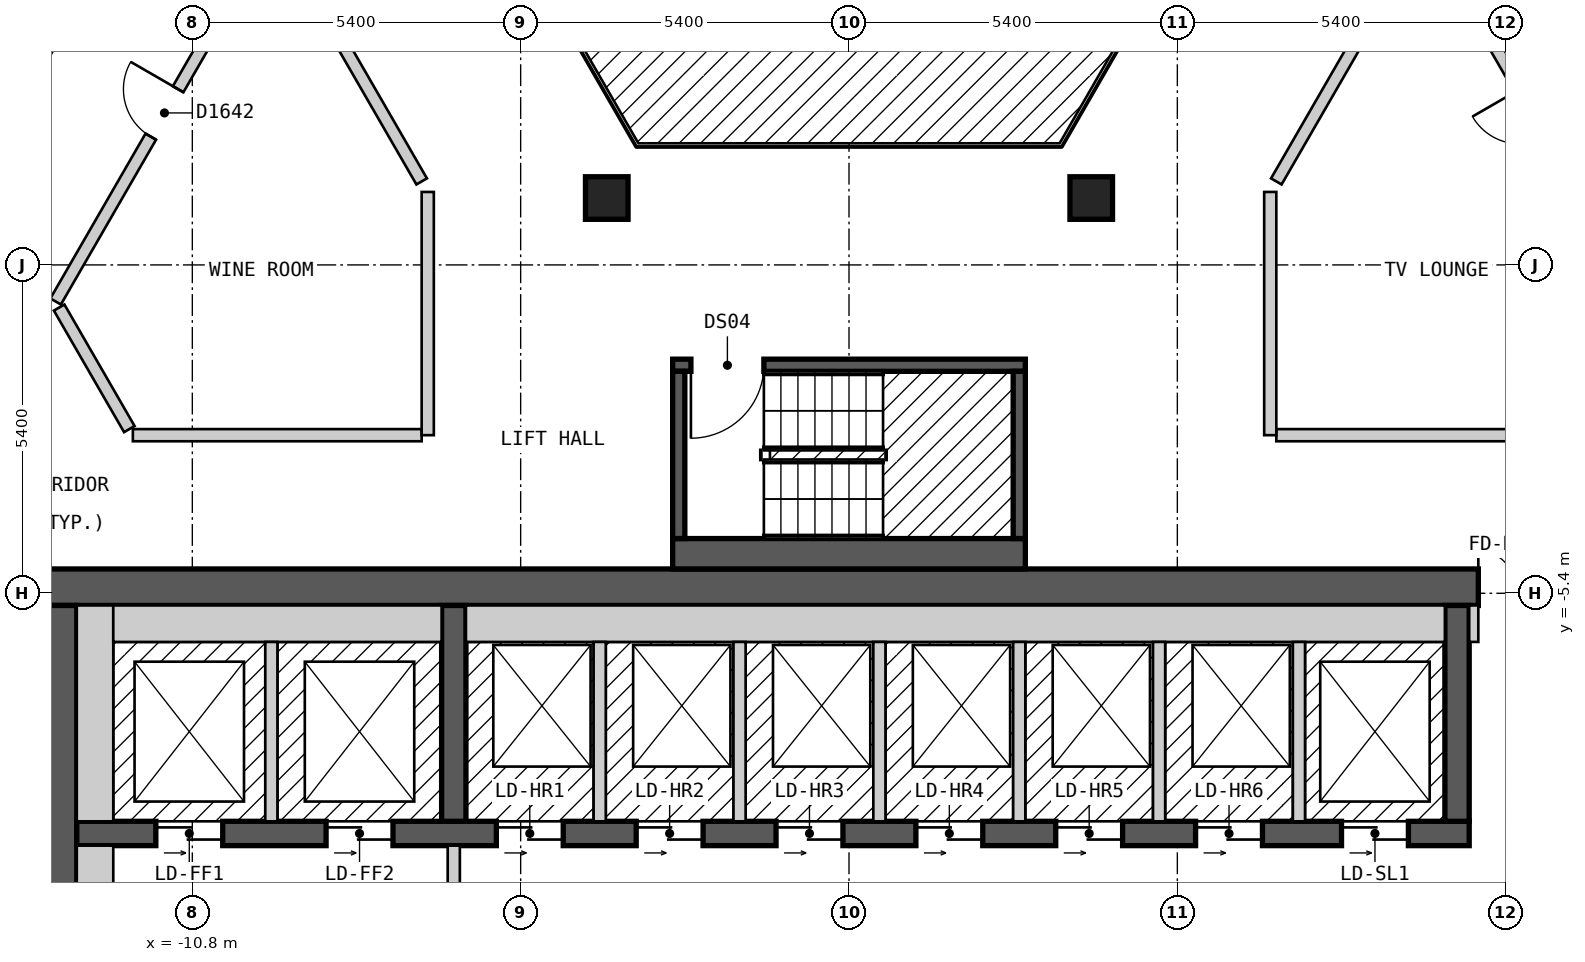
"""IFC4 building model, lengths in metres.
Left out: names, types, materials, properties, quantities, classifications, styles, units other than length and angle.
Written with IfcOpenShell. Run it as: python <this file> out.ifc"""

import sys

from ifc_helpers import new_model, si_unit, direction, frame, frame_2d, origin, origin_2d, place, context, subcontext, project, spatial, rectangle, extrude, element, fill, save


model = new_model("IFC4")
c1 = context("Model", 3, precision=1e-05, world=origin(), true_north=direction((0.0, 1.0)))
c2 = subcontext(c1, "Body", "Model", "MODEL_VIEW")
j1 = project(units=[si_unit("LENGTHUNIT", "METRE"), si_unit("PLANEANGLEUNIT", "RADIAN")], contexts=[c1])
p1 = place(None, origin())
s1 = spatial("IfcSite", under=j1, at=p1, CompositionType="ELEMENT")
p2 = place(p1, origin())
s2 = spatial("IfcBuilding", under=s1, at=p2, CompositionType="ELEMENT")
p3 = place(p2, frame((0.0, 0.0, 163.2)))
s3 = spatial("IfcBuildingStorey", under=s2, at=p3, CompositionType="ELEMENT", Elevation=163.2)
for number, where, z_axis, x_axis in (
    (1, (3.984, 1.1, 0.0), (0.0, 0.0, 1.0), (1.0, 0.0, 0.0)),
    (2, (-3.984, 1.1, 0.0), (0.0, 0.0, 1.0), (1.0, 0.0, 0.0)),
):
    element("IfcColumn", number, at=place(p3, frame(where, z_axis=z_axis, x_axis=x_axis)), inside=s3, PredefinedType="COLUMN", context=c2, shape_type="SweptSolid", body=[
        extrude(rectangle(XDim=0.7, YDim=0.7, at=origin_2d()), origin(), (0.0, 0.0, 1.0), 3.0),
    ])
p4 = place(p3, frame((-13.3, -5.3, 0.0), z_axis=(0.0, 0.0, 1.0), x_axis=(1.0, 0.0, 0.0)))
e3 = element("IfcWall", 3, at=p4, inside=s3, PredefinedType="SHEAR", context=c2, shape_type="SweptSolid", body=[
    extrude(rectangle(XDim=26.6, YDim=0.6, at=frame_2d((13.3, 0.0))), origin(), (0.0, 0.0, 1.0), 2.7),
])
p5 = place(p4, frame((23.65, 0.0, 0.0)))
e4 = element("IfcOpeningElement", 4, at=p5, cuts=e3, PredefinedType="OPENING", context=c2, shape_type="SweptSolid", body=[
    extrude(rectangle(XDim=1.2, YDim=2.1, at=frame_2d((0.6, 1.05))), frame((0.0, 0.31, 0.0), z_axis=(0.0, -1.0, 0.0), x_axis=(1.0, 0.0, 0.0)), (0.0, 0.0, 1.0), 0.62),
])
p6 = place(p3, frame((-13.0, -18.4, 0.0), z_axis=(0.0, 0.0, 1.0), x_axis=(0.0, 1.0, 0.0)))
e5 = element("IfcWall", 5, at=p6, inside=s3, PredefinedType="SHEAR", context=c2, shape_type="SweptSolid", body=[
    extrude(rectangle(XDim=12.8, YDim=0.6, at=frame_2d((6.4, 0.0))), origin(), (0.0, 0.0, 1.0), 2.7),
])
p7 = place(p6, frame((4.2, 0.0, 0.0)))
e6 = element("IfcOpeningElement", 6, at=p7, cuts=e5, PredefinedType="OPENING", context=c2, shape_type="SweptSolid", body=[
    extrude(rectangle(XDim=1.2, YDim=2.1, at=frame_2d((0.6, 1.05))), frame((0.0, 0.31, 0.0), z_axis=(0.0, -1.0, 0.0), x_axis=(1.0, 0.0, 0.0)), (0.0, 0.0, 1.0), 0.62),
])
p8 = place(p3, frame((-12.7, -9.35, 0.0), z_axis=(0.0, 0.0, 1.0), x_axis=(1.0, 0.0, 0.0)))
e7 = element("IfcWall", 7, at=p8, inside=s3, PredefinedType="SHEAR", context=c2, shape_type="SweptSolid", body=[
    extrude(rectangle(XDim=22.9, YDim=0.4, at=frame_2d((11.45, 0.0))), origin(), (0.0, 0.0, 1.0), 2.7),
])
p9 = place(p8, frame((1.3, 0.0, 0.0)))
e8 = element("IfcOpeningElement", 8, at=p9, cuts=e7, PredefinedType="OPENING", context=c2, shape_type="SweptSolid", body=[
    extrude(rectangle(XDim=1.1, YDim=2.1, at=frame_2d((0.55, 1.05))), frame((0.0, 0.21, 0.0), z_axis=(0.0, -1.0, 0.0), x_axis=(1.0, 0.0, 0.0)), (0.0, 0.0, 1.0), 0.42),
])
p10 = place(p8, frame((4.1, 0.0, 0.0)))
e9 = element("IfcOpeningElement", 9, at=p10, cuts=e7, PredefinedType="OPENING", context=c2, shape_type="SweptSolid", body=[
    extrude(rectangle(XDim=1.1, YDim=2.1, at=frame_2d((0.55, 1.05))), frame((0.0, 0.21, 0.0), z_axis=(0.0, -1.0, 0.0), x_axis=(1.0, 0.0, 0.0)), (0.0, 0.0, 1.0), 0.42),
])
p11 = place(p8, frame((6.9, 0.0, 0.0)))
e10 = element("IfcOpeningElement", 10, at=p11, cuts=e7, PredefinedType="OPENING", context=c2, shape_type="SweptSolid", body=[
    extrude(rectangle(XDim=1.1, YDim=2.1, at=frame_2d((0.55, 1.05))), frame((0.0, 0.21, 0.0), z_axis=(0.0, -1.0, 0.0), x_axis=(1.0, 0.0, 0.0)), (0.0, 0.0, 1.0), 0.42),
])
p12 = place(p8, frame((9.2, 0.0, 0.0)))
e11 = element("IfcOpeningElement", 11, at=p12, cuts=e7, PredefinedType="OPENING", context=c2, shape_type="SweptSolid", body=[
    extrude(rectangle(XDim=1.1, YDim=2.1, at=frame_2d((0.55, 1.05))), frame((0.0, 0.21, 0.0), z_axis=(0.0, -1.0, 0.0), x_axis=(1.0, 0.0, 0.0)), (0.0, 0.0, 1.0), 0.42),
])
p13 = place(p8, frame((11.5, 0.0, 0.0)))
e12 = element("IfcOpeningElement", 12, at=p13, cuts=e7, PredefinedType="OPENING", context=c2, shape_type="SweptSolid", body=[
    extrude(rectangle(XDim=1.1, YDim=2.1, at=frame_2d((0.55, 1.05))), frame((0.0, 0.21, 0.0), z_axis=(0.0, -1.0, 0.0), x_axis=(1.0, 0.0, 0.0)), (0.0, 0.0, 1.0), 0.42),
])
p14 = place(p8, frame((13.8, 0.0, 0.0)))
e13 = element("IfcOpeningElement", 13, at=p14, cuts=e7, PredefinedType="OPENING", context=c2, shape_type="SweptSolid", body=[
    extrude(rectangle(XDim=1.1, YDim=2.1, at=frame_2d((0.55, 1.05))), frame((0.0, 0.21, 0.0), z_axis=(0.0, -1.0, 0.0), x_axis=(1.0, 0.0, 0.0)), (0.0, 0.0, 1.0), 0.42),
])
p15 = place(p8, frame((16.1, 0.0, 0.0)))
e14 = element("IfcOpeningElement", 14, at=p15, cuts=e7, PredefinedType="OPENING", context=c2, shape_type="SweptSolid", body=[
    extrude(rectangle(XDim=1.1, YDim=2.1, at=frame_2d((0.55, 1.05))), frame((0.0, 0.21, 0.0), z_axis=(0.0, -1.0, 0.0), x_axis=(1.0, 0.0, 0.0)), (0.0, 0.0, 1.0), 0.42),
])
p16 = place(p8, frame((18.4, 0.0, 0.0)))
e15 = element("IfcOpeningElement", 15, at=p16, cuts=e7, PredefinedType="OPENING", context=c2, shape_type="SweptSolid", body=[
    extrude(rectangle(XDim=1.1, YDim=2.1, at=frame_2d((0.55, 1.05))), frame((0.0, 0.21, 0.0), z_axis=(0.0, -1.0, 0.0), x_axis=(1.0, 0.0, 0.0)), (0.0, 0.0, 1.0), 0.42),
])
p17 = place(p8, frame((20.8, 0.0, 0.0)))
e16 = element("IfcOpeningElement", 16, at=p17, cuts=e7, PredefinedType="OPENING", context=c2, shape_type="SweptSolid", body=[
    extrude(rectangle(XDim=1.1, YDim=2.1, at=frame_2d((0.55, 1.05))), frame((0.0, 0.21, 0.0), z_axis=(0.0, -1.0, 0.0), x_axis=(1.0, 0.0, 0.0)), (0.0, 0.0, 1.0), 0.42),
])
for number, where, z_axis, x_axis in (
    (17, (-6.5, -9.15, 0.0), (0.0, 0.0, 1.0), (0.0, 1.0, 0.0)),
    (18, (10.0, -9.15, 0.0), (0.0, 0.0, 1.0), (0.0, 1.0, 0.0)),
):
    element("IfcWall", number, at=place(p3, frame(where, z_axis=z_axis, x_axis=x_axis)), inside=s3, PredefinedType="SHEAR", context=c2, shape_type="SweptSolid", body=[
        extrude(rectangle(XDim=3.55, YDim=0.4, at=frame_2d((1.775, 0.0))), origin(), (0.0, 0.0, 1.0), 2.7),
    ])
p18 = place(p3, frame((-2.9, -4.75, 0.0), z_axis=(0.0, 0.0, 1.0), x_axis=(1.0, 0.0, 0.0)))
e19 = element("IfcWall", 19, at=p18, inside=s3, PredefinedType="SOLIDWALL", context=c2, shape_type="SweptSolid", body=[
    extrude(rectangle(XDim=5.8, YDim=0.5, at=frame_2d((2.9, 0.0))), origin(), (0.0, 0.0, 1.0), 2.7),
])
p19 = place(p3, frame((-2.9, -1.65, 0.0), z_axis=(0.0, 0.0, 1.0), x_axis=(1.0, 0.0, 0.0)))
e20 = element("IfcWall", 20, at=p19, inside=s3, PredefinedType="SOLIDWALL", context=c2, shape_type="SweptSolid", body=[
    extrude(rectangle(XDim=5.8, YDim=0.2, at=frame_2d((2.9, 0.0))), origin(), (0.0, 0.0, 1.0), 2.7),
])
p20 = place(p19, frame((0.3, 0.0, 0.0)))
e21 = element("IfcOpeningElement", 21, at=p20, cuts=e20, PredefinedType="OPENING", context=c2, shape_type="SweptSolid", body=[
    extrude(rectangle(XDim=1.2, YDim=2.1, at=frame_2d((0.6, 1.05))), frame((0.0, 0.11, 0.0), z_axis=(0.0, -1.0, 0.0), x_axis=(1.0, 0.0, 0.0)), (0.0, 0.0, 1.0), 0.22),
])
for number, where, z_axis, x_axis in (
    (22, (-2.8, -4.5, 0.0), (0.0, 0.0, 1.0), (0.0, 1.0, 0.0)),
    (23, (2.8, -4.5, 0.0), (0.0, 0.0, 1.0), (0.0, 1.0, 0.0)),
):
    element("IfcWall", number, at=place(p3, frame(where, z_axis=z_axis, x_axis=x_axis)), inside=s3, PredefinedType="SOLIDWALL", context=c2, shape_type="SweptSolid", body=[
        extrude(rectangle(XDim=2.75, YDim=0.2, at=frame_2d((1.375, 0.0))), origin(), (0.0, 0.0, 1.0), 2.7),
    ])
p21 = place(p3, frame((-9.411, 5.5, 0.0), z_axis=(0.0, 0.0, 1.0), x_axis=(0.500018099276, -0.86601495391, 0.0)))
e24 = element("IfcWall", 24, at=p21, inside=s3, PredefinedType="PARTITIONING", context=c2, shape_type="SweptSolid", body=[
    extrude(rectangle(XDim=4.765, YDim=0.2, at=frame_2d((2.383, 0.0))), origin(), (0.0, 0.0, 1.0), 2.7),
])
p22 = place(p3, frame((-12.99, -0.701, 0.0), z_axis=(0.0, 0.0, 1.0), x_axis=(0.499972710878, -0.866041158593, 0.0)))
e25 = element("IfcWall", 25, at=p22, inside=s3, PredefinedType="PARTITIONING", context=c2, shape_type="SweptSolid", body=[
    extrude(rectangle(XDim=2.308, YDim=0.2, at=frame_2d((1.154, 0.0))), origin(), (0.0, 0.0, 1.0), 2.7),
])
p23 = place(p3, frame((9.526, 5.5, 0.0), z_axis=(0.0, 0.0, 1.0), x_axis=(0.500062092869, -0.865989551482, 0.0)))
e26 = element("IfcWall", 26, at=p23, inside=s3, PredefinedType="PARTITIONING", context=c2, shape_type="SweptSolid", body=[
    extrude(rectangle(XDim=6.927, YDim=0.2, at=frame_2d((3.464, 0.0))), origin(), (0.0, 0.0, 1.0), 2.7),
])
p24 = place(p23, frame((3.014, 0.0, 0.0)))
e27 = element("IfcOpeningElement", 27, at=p24, cuts=e26, PredefinedType="OPENING", context=c2, shape_type="SweptSolid", body=[
    extrude(rectangle(XDim=0.9, YDim=2.1, at=frame_2d((0.45, 1.05))), frame((0.0, 0.11, 0.0), z_axis=(0.0, -1.0, 0.0), x_axis=(1.0, 0.0, 0.0)), (0.0, 0.0, 1.0), 0.22),
])
p25 = place(p3, frame((10.739, 7.8, 0.0), z_axis=(0.0, 0.0, 1.0), x_axis=(0.499964311759, -0.86604600742, 0.0)))
e28 = element("IfcWall", 28, at=p25, inside=s3, PredefinedType="PARTITIONING", context=c2, shape_type="SweptSolid", body=[
    extrude(rectangle(XDim=9.583, YDim=0.2, at=frame_2d((4.792, 0.0))), origin(), (0.0, 0.0, 1.0), 2.7),
])
p26 = place(p3, frame((-11.778, -2.8, 0.0), z_axis=(0.0, 0.0, 1.0), x_axis=(1.0, 0.0, 0.0)))
e29 = element("IfcWall", 29, at=p26, inside=s3, PredefinedType="PARTITIONING", context=c2, shape_type="SweptSolid", body=[
    extrude(rectangle(XDim=4.75, YDim=0.2, at=frame_2d((2.375, 0.0))), origin(), (0.0, 0.0, 1.0), 2.7),
])
p27 = place(p3, frame((7.028, -2.8, 0.0), z_axis=(0.0, 0.0, 1.0), x_axis=(1.0, 0.0, 0.0)))
e30 = element("IfcWall", 30, at=p27, inside=s3, PredefinedType="PARTITIONING", context=c2, shape_type="SweptSolid", body=[
    extrude(rectangle(XDim=4.634, YDim=0.2, at=frame_2d((2.317, 0.0))), origin(), (0.0, 0.0, 1.0), 2.7),
])
p28 = place(p3, frame((7.028, 1.373, 0.0), z_axis=(0.0, 0.0, 1.0), x_axis=(0.500065924398, 0.86598733897, 0.0)))
e31 = element("IfcWall", 31, at=p28, inside=s3, PredefinedType="PARTITIONING", context=c2, shape_type="SweptSolid", body=[
    extrude(rectangle(XDim=4.881, YDim=0.2, at=frame_2d((2.44, 0.0))), origin(), (0.0, 0.0, 1.0), 2.7),
])
p29 = place(p3, frame((-13.048, -0.601, 0.0), z_axis=(0.0, 0.0, 1.0), x_axis=(0.499982180423, 0.866035691677, 0.0)))
e32 = element("IfcWall", 32, at=p29, inside=s3, PredefinedType="PARTITIONING", context=c2, shape_type="SweptSolid", body=[
    extrude(rectangle(XDim=7.16, YDim=0.2, at=frame_2d((3.58, 0.0))), origin(), (0.0, 0.0, 1.0), 2.7),
])
p30 = place(p29, frame((3.13, 0.0, 0.0)))
e33 = element("IfcOpeningElement", 33, at=p30, cuts=e32, PredefinedType="OPENING", context=c2, shape_type="SweptSolid", body=[
    extrude(rectangle(XDim=0.9, YDim=2.1, at=frame_2d((0.45, 1.05))), frame((0.0, 0.11, 0.0), z_axis=(0.0, -1.0, 0.0), x_axis=(1.0, 0.0, 0.0)), (0.0, 0.0, 1.0), 0.22),
])
p31 = place(p3, frame((-15.53, -0.501, 0.0), z_axis=(0.0, 0.0, 1.0), x_axis=(0.499952498232, 0.866052827206, 0.0)))
e34 = element("IfcWall", 34, at=p31, inside=s3, PredefinedType="PARTITIONING", context=c2, shape_type="SweptSolid", body=[
    extrude(rectangle(XDim=9.585, YDim=0.2, at=frame_2d((4.792, 0.0))), origin(), (0.0, 0.0, 1.0), 2.7),
])
p32 = place(p31, frame((5.031, 0.0, 0.0)))
e35 = element("IfcOpeningElement", 35, at=p32, cuts=e34, PredefinedType="OPENING", context=c2, shape_type="SweptSolid", body=[
    extrude(rectangle(XDim=1.0, YDim=2.1, at=frame_2d((0.5, 1.05))), frame((0.0, 0.11, 0.0), z_axis=(0.0, -1.0, 0.0), x_axis=(1.0, 0.0, 0.0)), (0.0, 0.0, 1.0), 0.22),
])
for number, where, z_axis, x_axis in (
    (36, (6.928, -2.8, 0.0), (0.0, 0.0, 1.0), (0.0, 1.0, 0.0)),
    (37, (-6.928, -2.8, 0.0), (0.0, 0.0, 1.0), (0.0, 1.0, 0.0)),
):
    element("IfcWall", number, at=place(p3, frame(where, z_axis=z_axis, x_axis=x_axis)), inside=s3, PredefinedType="PARTITIONING", context=c2, shape_type="SweptSolid", body=[
        extrude(rectangle(XDim=4.0, YDim=0.2, at=frame_2d((2.0, 0.0))), origin(), (0.0, 0.0, 1.0), 2.7),
    ])
p33 = place(p3, frame((-12.4, -13.0, 0.0), z_axis=(0.0, 0.0, 1.0), x_axis=(0.0, 1.0, 0.0)))
e38 = element("IfcWall", 38, at=p33, inside=s3, PredefinedType="PARTITIONING", context=c2, shape_type="SweptSolid", body=[
    extrude(rectangle(XDim=3.45, YDim=0.6, at=frame_2d((1.725, 0.0))), origin(), (0.0, 0.0, 1.0), 2.7),
])
p34 = place(p3, frame((-12.4, -9.15, 0.0), z_axis=(0.0, 0.0, 1.0), x_axis=(0.0, 1.0, 0.0)))
e39 = element("IfcWall", 39, at=p34, inside=s3, PredefinedType="SOLIDWALL", context=c2, shape_type="SweptSolid", body=[
    extrude(rectangle(XDim=3.55, YDim=0.6, at=frame_2d((1.775, 0.0))), origin(), (0.0, 0.0, 1.0), 2.7),
])
p35 = place(p3, frame((-12.1, -5.9, 0.0), z_axis=(0.0, 0.0, 1.0), x_axis=(1.0, 0.0, 0.0)))
e40 = element("IfcWall", 40, at=p35, inside=s3, PredefinedType="SOLIDWALL", context=c2, shape_type="SweptSolid", body=[
    extrude(rectangle(XDim=5.4, YDim=0.6, at=frame_2d((2.7, 0.0))), origin(), (0.0, 0.0, 1.0), 2.7),
])
p36 = place(p3, frame((-9.5, -9.15, 0.0), z_axis=(0.0, 0.0, 1.0), x_axis=(0.0, 1.0, 0.0)))
e41 = element("IfcWall", 41, at=p36, inside=s3, PredefinedType="SOLIDWALL", context=c2, shape_type="SweptSolid", body=[
    extrude(rectangle(XDim=2.95, YDim=0.2, at=frame_2d((1.475, 0.0))), origin(), (0.0, 0.0, 1.0), 2.7),
])
p37 = place(p3, frame((-6.5, -14.45, 0.0), z_axis=(0.0, 0.0, 1.0), x_axis=(0.0, 1.0, 0.0)))
e42 = element("IfcWall", 42, at=p37, inside=s3, PredefinedType="PARTITIONING", context=c2, shape_type="SweptSolid", body=[
    extrude(rectangle(XDim=4.9, YDim=0.2, at=frame_2d((2.45, 0.0))), origin(), (0.0, 0.0, 1.0), 2.7),
])
p38 = place(p37, frame((3.15, 0.0, 0.0), z_axis=(0.0, 0.0, 1.0), x_axis=(-1.0, 0.0, 0.0)))
e43 = element("IfcOpeningElement", 43, at=p38, cuts=e42, PredefinedType="OPENING", context=c2, shape_type="SweptSolid", body=[
    extrude(rectangle(XDim=1.4, YDim=2.1, at=frame_2d((0.7, 1.05))), frame((0.0, 0.11, 0.0), z_axis=(0.0, -1.0, 0.0), x_axis=(1.0, 0.0, 0.0)), (0.0, 0.0, 1.0), 0.22),
])
p39 = place(p3, frame((-6.3, -5.9, 0.0), z_axis=(0.0, 0.0, 1.0), x_axis=(1.0, 0.0, 0.0)))
e44 = element("IfcWall", 44, at=p39, inside=s3, PredefinedType="SOLIDWALL", context=c2, shape_type="SweptSolid", body=[
    extrude(rectangle(XDim=16.1, YDim=0.6, at=frame_2d((8.05, 0.0))), origin(), (0.0, 0.0, 1.0), 2.7),
])
for number, where, z_axis, x_axis in (
    (45, (-4.1, -9.15, 0.0), (0.0, 0.0, 1.0), (0.0, 1.0, 0.0)),
    (46, (-1.8, -9.15, 0.0), (0.0, 0.0, 1.0), (0.0, 1.0, 0.0)),
    (47, (0.5, -9.15, 0.0), (0.0, 0.0, 1.0), (0.0, 1.0, 0.0)),
    (48, (2.8, -9.15, 0.0), (0.0, 0.0, 1.0), (0.0, 1.0, 0.0)),
    (49, (5.1, -9.15, 0.0), (0.0, 0.0, 1.0), (0.0, 1.0, 0.0)),
    (50, (7.4, -9.15, 0.0), (0.0, 0.0, 1.0), (0.0, 1.0, 0.0)),
):
    element("IfcWall", number, at=place(p3, frame(where, z_axis=z_axis, x_axis=x_axis)), inside=s3, PredefinedType="SOLIDWALL", context=c2, shape_type="SweptSolid", body=[
        extrude(rectangle(XDim=2.95, YDim=0.2, at=frame_2d((1.475, 0.0))), origin(), (0.0, 0.0, 1.0), 2.7),
    ])
p40 = place(p3, frame((10.275, -6.2, 0.0), z_axis=(0.0, 0.0, 1.0), x_axis=(0.0, 1.0, 0.0)))
e51 = element("IfcWall", 51, at=p40, inside=s3, PredefinedType="PARTITIONING", context=c2, shape_type="SweptSolid", body=[
    extrude(rectangle(XDim=0.6, YDim=0.15, at=frame_2d((0.3, 0.0))), origin(), (0.0, 0.0, 1.0), 2.7),
])
p41 = place(p20, origin())
e52 = element("IfcDoor", 52, at=p41, inside=s3, OperationType="SINGLE_SWING_LEFT", PredefinedType="DOOR", context=c2, shape_type="SweptSolid", body=[
    extrude(rectangle(XDim=1.2, YDim=2.1, at=frame_2d((0.6, 1.05))), frame((0.0, 0.025, 0.0), z_axis=(0.0, -1.0, 0.0), x_axis=(1.0, 0.0, 0.0)), (0.0, 0.0, 1.0), 0.05),
])
fill(e21, e52)
p42 = place(p30, origin())
e53 = element("IfcDoor", 53, at=p42, inside=s3, OperationType="SINGLE_SWING_RIGHT", PredefinedType="DOOR", context=c2, shape_type="SweptSolid", body=[
    extrude(rectangle(XDim=0.9, YDim=2.1, at=frame_2d((0.45, 1.05))), frame((0.0, 0.025, 0.0), z_axis=(0.0, -1.0, 0.0), x_axis=(1.0, 0.0, 0.0)), (0.0, 0.0, 1.0), 0.05),
])
fill(e33, e53)
p43 = place(p9, origin())
e54 = element("IfcDoor", 54, at=p43, inside=s3, OperationType="DOUBLE_DOOR_SLIDING", PredefinedType="DOOR", context=c2, shape_type="SweptSolid", body=[
    extrude(rectangle(XDim=1.1, YDim=2.1, at=frame_2d((0.55, 1.05))), frame((0.0, 0.025, 0.0), z_axis=(0.0, -1.0, 0.0), x_axis=(1.0, 0.0, 0.0)), (0.0, 0.0, 1.0), 0.05),
])
fill(e8, e54)
p44 = place(p10, origin())
e55 = element("IfcDoor", 55, at=p44, inside=s3, OperationType="DOUBLE_DOOR_SLIDING", PredefinedType="DOOR", context=c2, shape_type="SweptSolid", body=[
    extrude(rectangle(XDim=1.1, YDim=2.1, at=frame_2d((0.55, 1.05))), frame((0.0, 0.025, 0.0), z_axis=(0.0, -1.0, 0.0), x_axis=(1.0, 0.0, 0.0)), (0.0, 0.0, 1.0), 0.05),
])
fill(e9, e55)
p45 = place(p11, origin())
e56 = element("IfcDoor", 56, at=p45, inside=s3, OperationType="DOUBLE_DOOR_SLIDING", PredefinedType="DOOR", context=c2, shape_type="SweptSolid", body=[
    extrude(rectangle(XDim=1.1, YDim=2.1, at=frame_2d((0.55, 1.05))), frame((0.0, 0.025, 0.0), z_axis=(0.0, -1.0, 0.0), x_axis=(1.0, 0.0, 0.0)), (0.0, 0.0, 1.0), 0.05),
])
fill(e10, e56)
p46 = place(p12, origin())
e57 = element("IfcDoor", 57, at=p46, inside=s3, OperationType="DOUBLE_DOOR_SLIDING", PredefinedType="DOOR", context=c2, shape_type="SweptSolid", body=[
    extrude(rectangle(XDim=1.1, YDim=2.1, at=frame_2d((0.55, 1.05))), frame((0.0, 0.025, 0.0), z_axis=(0.0, -1.0, 0.0), x_axis=(1.0, 0.0, 0.0)), (0.0, 0.0, 1.0), 0.05),
])
fill(e11, e57)
p47 = place(p13, origin())
e58 = element("IfcDoor", 58, at=p47, inside=s3, OperationType="DOUBLE_DOOR_SLIDING", PredefinedType="DOOR", context=c2, shape_type="SweptSolid", body=[
    extrude(rectangle(XDim=1.1, YDim=2.1, at=frame_2d((0.55, 1.05))), frame((0.0, 0.025, 0.0), z_axis=(0.0, -1.0, 0.0), x_axis=(1.0, 0.0, 0.0)), (0.0, 0.0, 1.0), 0.05),
])
fill(e12, e58)
p48 = place(p14, origin())
e59 = element("IfcDoor", 59, at=p48, inside=s3, OperationType="DOUBLE_DOOR_SLIDING", PredefinedType="DOOR", context=c2, shape_type="SweptSolid", body=[
    extrude(rectangle(XDim=1.1, YDim=2.1, at=frame_2d((0.55, 1.05))), frame((0.0, 0.025, 0.0), z_axis=(0.0, -1.0, 0.0), x_axis=(1.0, 0.0, 0.0)), (0.0, 0.0, 1.0), 0.05),
])
fill(e13, e59)
p49 = place(p15, origin())
e60 = element("IfcDoor", 60, at=p49, inside=s3, OperationType="DOUBLE_DOOR_SLIDING", PredefinedType="DOOR", context=c2, shape_type="SweptSolid", body=[
    extrude(rectangle(XDim=1.1, YDim=2.1, at=frame_2d((0.55, 1.05))), frame((0.0, 0.025, 0.0), z_axis=(0.0, -1.0, 0.0), x_axis=(1.0, 0.0, 0.0)), (0.0, 0.0, 1.0), 0.05),
])
fill(e14, e60)
p50 = place(p16, origin())
e61 = element("IfcDoor", 61, at=p50, inside=s3, OperationType="DOUBLE_DOOR_SLIDING", PredefinedType="DOOR", context=c2, shape_type="SweptSolid", body=[
    extrude(rectangle(XDim=1.1, YDim=2.1, at=frame_2d((0.55, 1.05))), frame((0.0, 0.025, 0.0), z_axis=(0.0, -1.0, 0.0), x_axis=(1.0, 0.0, 0.0)), (0.0, 0.0, 1.0), 0.05),
])
fill(e15, e61)
p51 = place(p17, origin())
e62 = element("IfcDoor", 62, at=p51, inside=s3, OperationType="DOUBLE_DOOR_SLIDING", PredefinedType="DOOR", context=c2, shape_type="SweptSolid", body=[
    extrude(rectangle(XDim=1.1, YDim=2.1, at=frame_2d((0.55, 1.05))), frame((0.0, 0.025, 0.0), z_axis=(0.0, -1.0, 0.0), x_axis=(1.0, 0.0, 0.0)), (0.0, 0.0, 1.0), 0.05),
])
fill(e16, e62)
p52 = place(p5, origin())
e63 = element("IfcDoor", 63, at=p52, inside=s3, OperationType="DOUBLE_DOOR_SINGLE_SWING", PredefinedType="DOOR", context=c2, shape_type="SweptSolid", body=[
    extrude(rectangle(XDim=1.2, YDim=2.1, at=frame_2d((0.6, 1.05))), frame((0.0, 0.025, 0.0), z_axis=(0.0, -1.0, 0.0), x_axis=(1.0, 0.0, 0.0)), (0.0, 0.0, 1.0), 0.05),
])
fill(e4, e63)
save(model, sys.argv[1])
